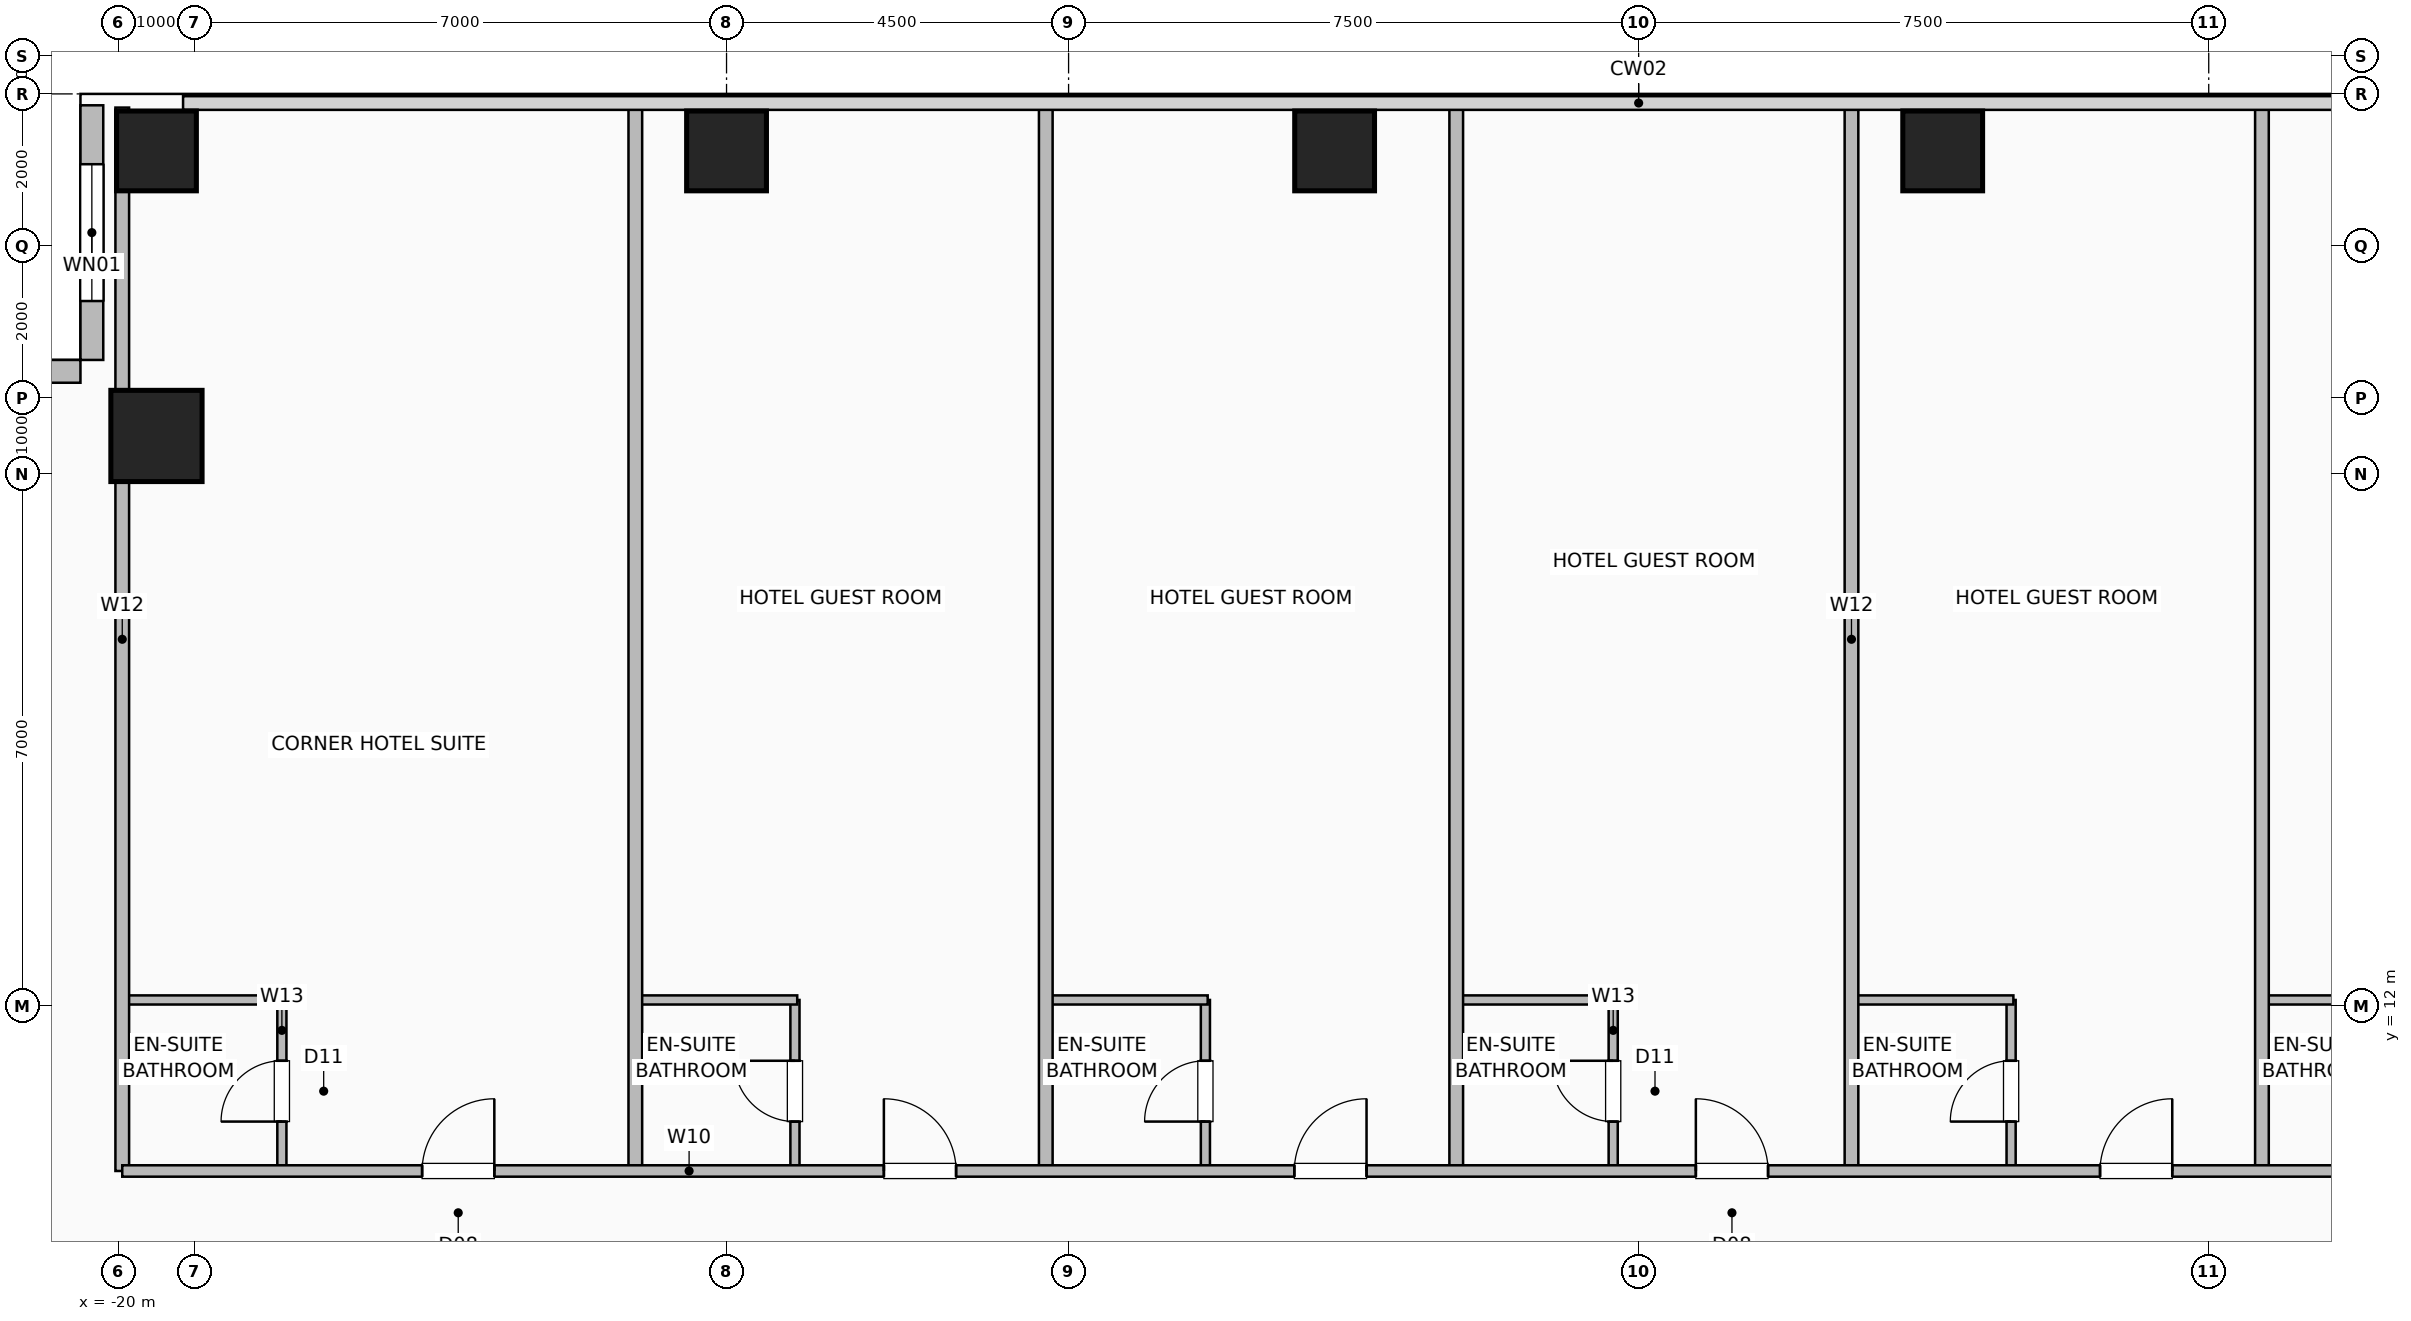
"""IFC4 building model, lengths in metres.
Left out: names, types, materials, properties, quantities, classifications, styles, units other than length and angle.
Written with IfcOpenShell. Run it as: python <this file> out.ifc"""

import sys

from ifc_helpers import new_model, si_unit, direction, frame, frame_2d, origin, origin_2d, place, context, subcontext, project, spatial, rectangle, hollow_rectangle, extrude, element, fill, save


model = new_model("IFC4")
c1 = context("Model", 3, precision=1e-05, world=origin(), true_north=direction((0.0, 1.0)))
c2 = subcontext(c1, "Body", "Model", "MODEL_VIEW")
j1 = project(units=[si_unit("LENGTHUNIT", "METRE"), si_unit("PLANEANGLEUNIT", "RADIAN")], contexts=[c1])
p1 = place(None, origin())
s1 = spatial("IfcSite", under=j1, at=p1, CompositionType="ELEMENT")
p2 = place(p1, origin())
s2 = spatial("IfcBuilding", under=s1, at=p2, CompositionType="ELEMENT")
p3 = place(p2, frame((0.0, 0.0, 72.5)))
s3 = spatial("IfcBuildingStorey", under=s2, at=p3, CompositionType="ELEMENT", Elevation=72.5)
for number, where, z_axis, x_axis in (
    (1, (-19.5, 23.25, 0.0), (0.0, 0.0, 1.0), (1.0, 0.0, 0.0)),
    (2, (-12.0, 23.25, 0.0), (0.0, 0.0, 1.0), (1.0, 0.0, 0.0)),
    (3, (-4.0, 23.25, 0.0), (0.0, 0.0, 1.0), (1.0, 0.0, 0.0)),
    (4, (4.0, 23.25, 0.0), (0.0, 0.0, 1.0), (1.0, 0.0, 0.0)),
):
    element("IfcColumn", number, at=place(p3, frame(where, z_axis=z_axis, x_axis=x_axis)), inside=s3, PredefinedType="COLUMN", context=c2, shape_type="SweptSolid", body=[
        extrude(hollow_rectangle(XDim=1.05, YDim=1.05, WallThickness=0.05, at=origin_2d()), origin(), (0.0, 0.0, 1.0), 3.5),
    ])
p4 = place(p3, frame((-19.5, 19.5, 0.0), z_axis=(0.0, 0.0, 1.0), x_axis=(1.0, 0.0, 0.0)))
e5 = element("IfcColumn", 5, at=p4, inside=s3, PredefinedType="COLUMN", context=c2, shape_type="SweptSolid", body=[
    extrude(hollow_rectangle(XDim=1.2, YDim=1.2, WallThickness=0.055, at=origin_2d()), origin(), (0.0, 0.0, 1.0), 3.5),
])
p5 = place(p3, frame((-20.35, 23.85, 0.0), z_axis=(0.0, 0.0, 1.0), x_axis=(0.0, -1.0, 0.0)))
e6 = element("IfcWall", 6, at=p5, inside=s3, PredefinedType="SOLIDWALL", context=c2, shape_type="SweptSolid", body=[
    extrude(rectangle(XDim=3.35, YDim=0.3, at=frame_2d((1.675, 0.0))), origin(), (0.0, 0.0, 1.0), 3.25),
])
p6 = place(p5, frame((0.775, 0.0, 0.9)))
e7 = element("IfcOpeningElement", 7, at=p6, cuts=e6, PredefinedType="OPENING", context=c2, shape_type="SweptSolid", body=[
    extrude(rectangle(XDim=1.8, YDim=1.8, at=frame_2d((0.9, 0.9))), frame((0.0, 0.16, 0.0), z_axis=(0.0, -1.0, 0.0), x_axis=(1.0, 0.0, 0.0)), (0.0, 0.0, 1.0), 0.32),
])
p7 = place(p3, frame((-23.85, 20.35, 0.0), z_axis=(0.0, 0.0, 1.0), x_axis=(1.0, 0.0, 0.0)))
e8 = element("IfcWall", 8, at=p7, inside=s3, PredefinedType="SOLIDWALL", context=c2, shape_type="SweptSolid", body=[
    extrude(rectangle(XDim=3.35, YDim=0.3, at=frame_2d((1.675, 0.0))), origin(), (0.0, 0.0, 1.0), 3.25),
])
p8 = place(p3, frame((-17.85, 9.83, 0.0), z_axis=(0.0, 0.0, 1.0), x_axis=(0.0, 1.0, 0.0)))
e9 = element("IfcWall", 9, at=p8, inside=s3, PredefinedType="PLUMBINGWALL", context=c2, shape_type="SweptSolid", body=[
    extrude(rectangle(XDim=2.25, YDim=0.12, at=frame_2d((1.125, 0.0))), origin(), (0.0, 0.0, 1.0), 3.25),
])
p9 = place(p8, frame((0.65, 0.0, 0.0)))
e10 = element("IfcOpeningElement", 10, at=p9, cuts=e9, PredefinedType="OPENING", context=c2, shape_type="SweptSolid", body=[
    extrude(rectangle(XDim=0.8, YDim=2.05, at=frame_2d((0.4, 1.025))), frame((0.0, 0.07, 0.0), z_axis=(0.0, -1.0, 0.0), x_axis=(1.0, 0.0, 0.0)), (0.0, 0.0, 1.0), 0.14),
])
p10 = place(p3, frame((-19.92, 12.08, 0.0), z_axis=(0.0, 0.0, 1.0), x_axis=(1.0, 0.0, 0.0)))
e11 = element("IfcWall", 11, at=p10, inside=s3, PredefinedType="PLUMBINGWALL", context=c2, shape_type="SweptSolid", body=[
    extrude(rectangle(XDim=2.1, YDim=0.12, at=frame_2d((1.05, 0.0))), origin(), (0.0, 0.0, 1.0), 3.25),
])
p11 = place(p3, frame((-11.1, 9.83, 0.0), z_axis=(0.0, 0.0, 1.0), x_axis=(0.0, 1.0, 0.0)))
e12 = element("IfcWall", 12, at=p11, inside=s3, PredefinedType="PLUMBINGWALL", context=c2, shape_type="SweptSolid", body=[
    extrude(rectangle(XDim=2.25, YDim=0.12, at=frame_2d((1.125, 0.0))), origin(), (0.0, 0.0, 1.0), 3.25),
])
p12 = place(p11, frame((0.65, 0.0, 0.0)))
e13 = element("IfcOpeningElement", 13, at=p12, cuts=e12, PredefinedType="OPENING", context=c2, shape_type="SweptSolid", body=[
    extrude(rectangle(XDim=0.8, YDim=2.05, at=frame_2d((0.4, 1.025))), frame((0.0, 0.07, 0.0), z_axis=(0.0, -1.0, 0.0), x_axis=(1.0, 0.0, 0.0)), (0.0, 0.0, 1.0), 0.14),
])
p13 = place(p3, frame((-13.17, 12.08, 0.0), z_axis=(0.0, 0.0, 1.0), x_axis=(1.0, 0.0, 0.0)))
e14 = element("IfcWall", 14, at=p13, inside=s3, PredefinedType="PLUMBINGWALL", context=c2, shape_type="SweptSolid", body=[
    extrude(rectangle(XDim=2.1, YDim=0.12, at=frame_2d((1.05, 0.0))), origin(), (0.0, 0.0, 1.0), 3.25),
])
p14 = place(p3, frame((-5.7, 9.83, 0.0), z_axis=(0.0, 0.0, 1.0), x_axis=(0.0, 1.0, 0.0)))
e15 = element("IfcWall", 15, at=p14, inside=s3, PredefinedType="PLUMBINGWALL", context=c2, shape_type="SweptSolid", body=[
    extrude(rectangle(XDim=2.25, YDim=0.12, at=frame_2d((1.125, 0.0))), origin(), (0.0, 0.0, 1.0), 3.25),
])
p15 = place(p14, frame((0.65, 0.0, 0.0)))
e16 = element("IfcOpeningElement", 16, at=p15, cuts=e15, PredefinedType="OPENING", context=c2, shape_type="SweptSolid", body=[
    extrude(rectangle(XDim=0.8, YDim=2.05, at=frame_2d((0.4, 1.025))), frame((0.0, 0.07, 0.0), z_axis=(0.0, -1.0, 0.0), x_axis=(1.0, 0.0, 0.0)), (0.0, 0.0, 1.0), 0.14),
])
p16 = place(p3, frame((-7.77, 12.08, 0.0), z_axis=(0.0, 0.0, 1.0), x_axis=(1.0, 0.0, 0.0)))
e17 = element("IfcWall", 17, at=p16, inside=s3, PredefinedType="PLUMBINGWALL", context=c2, shape_type="SweptSolid", body=[
    extrude(rectangle(XDim=2.1, YDim=0.12, at=frame_2d((1.05, 0.0))), origin(), (0.0, 0.0, 1.0), 3.25),
])
p17 = place(p3, frame((-0.335, 9.83, 0.0), z_axis=(0.0, 0.0, 1.0), x_axis=(0.0, 1.0, 0.0)))
e18 = element("IfcWall", 18, at=p17, inside=s3, PredefinedType="PLUMBINGWALL", context=c2, shape_type="SweptSolid", body=[
    extrude(rectangle(XDim=2.25, YDim=0.12, at=frame_2d((1.125, 0.0))), origin(), (0.0, 0.0, 1.0), 3.25),
])
p18 = place(p17, frame((0.65, 0.0, 0.0)))
e19 = element("IfcOpeningElement", 19, at=p18, cuts=e18, PredefinedType="OPENING", context=c2, shape_type="SweptSolid", body=[
    extrude(rectangle(XDim=0.8, YDim=2.05, at=frame_2d((0.4, 1.025))), frame((0.0, 0.07, 0.0), z_axis=(0.0, -1.0, 0.0), x_axis=(1.0, 0.0, 0.0)), (0.0, 0.0, 1.0), 0.14),
])
p19 = place(p3, frame((-2.37, 12.08, 0.0), z_axis=(0.0, 0.0, 1.0), x_axis=(1.0, 0.0, 0.0)))
e20 = element("IfcWall", 20, at=p19, inside=s3, PredefinedType="PLUMBINGWALL", context=c2, shape_type="SweptSolid", body=[
    extrude(rectangle(XDim=2.065, YDim=0.12, at=frame_2d((1.033, 0.0))), origin(), (0.0, 0.0, 1.0), 3.25),
])
p20 = place(p3, frame((4.9, 9.83, 0.0), z_axis=(0.0, 0.0, 1.0), x_axis=(0.0, 1.0, 0.0)))
e21 = element("IfcWall", 21, at=p20, inside=s3, PredefinedType="PLUMBINGWALL", context=c2, shape_type="SweptSolid", body=[
    extrude(rectangle(XDim=2.25, YDim=0.12, at=frame_2d((1.125, 0.0))), origin(), (0.0, 0.0, 1.0), 3.25),
])
p21 = place(p20, frame((0.65, 0.0, 0.0)))
e22 = element("IfcOpeningElement", 22, at=p21, cuts=e21, PredefinedType="OPENING", context=c2, shape_type="SweptSolid", body=[
    extrude(rectangle(XDim=0.8, YDim=2.05, at=frame_2d((0.4, 1.025))), frame((0.0, 0.07, 0.0), z_axis=(0.0, -1.0, 0.0), x_axis=(1.0, 0.0, 0.0)), (0.0, 0.0, 1.0), 0.14),
])
p22 = place(p3, frame((2.83, 12.08, 0.0), z_axis=(0.0, 0.0, 1.0), x_axis=(1.0, 0.0, 0.0)))
e23 = element("IfcWall", 23, at=p22, inside=s3, PredefinedType="PLUMBINGWALL", context=c2, shape_type="SweptSolid", body=[
    extrude(rectangle(XDim=2.1, YDim=0.12, at=frame_2d((1.05, 0.0))), origin(), (0.0, 0.0, 1.0), 3.25),
])
p23 = place(p3, frame((8.23, 12.08, 0.0), z_axis=(0.0, 0.0, 1.0), x_axis=(1.0, 0.0, 0.0)))
e24 = element("IfcWall", 24, at=p23, inside=s3, PredefinedType="PLUMBINGWALL", context=c2, shape_type="SweptSolid", body=[
    extrude(rectangle(XDim=2.1, YDim=0.12, at=frame_2d((1.05, 0.0))), origin(), (0.0, 0.0, 1.0), 3.25),
])
for number, where, z_axis, x_axis in (
    (25, (-19.95, 9.83, 0.0), (0.0, 0.0, 1.0), (0.0, 1.0, 0.0)),
    (26, (-13.2, 9.83, 0.0), (0.0, 0.0, 1.0), (0.0, 1.0, 0.0)),
    (27, (-7.8, 9.83, 0.0), (0.0, 0.0, 1.0), (0.0, 1.0, 0.0)),
    (28, (-2.4, 9.83, 0.0), (0.0, 0.0, 1.0), (0.0, 1.0, 0.0)),
    (29, (2.8, 9.83, 0.0), (0.0, 0.0, 1.0), (0.0, 1.0, 0.0)),
    (30, (8.2, 9.83, 0.0), (0.0, 0.0, 1.0), (0.0, 1.0, 0.0)),
):
    element("IfcWall", number, at=place(p3, frame(where, z_axis=z_axis, x_axis=x_axis)), inside=s3, PredefinedType="PARTITIONING", context=c2, shape_type="SweptSolid", body=[
        extrude(rectangle(XDim=13.99, YDim=0.18, at=frame_2d((6.995, 0.0))), origin(), (0.0, 0.0, 1.0), 3.25),
    ])
p24 = place(p3, frame((-19.95, 9.83, 0.0), z_axis=(0.0, 0.0, 1.0), x_axis=(1.0, 0.0, 0.0)))
e31 = element("IfcWall", 31, at=p24, inside=s3, PredefinedType="PARTITIONING", context=c2, shape_type="SweptSolid", body=[
    extrude(rectangle(XDim=39.9, YDim=0.15, at=frame_2d((19.95, 0.0))), origin(), (0.0, 0.0, 1.0), 3.25),
])
p25 = place(p24, frame((3.945, 0.0, 0.0)))
e32 = element("IfcOpeningElement", 32, at=p25, cuts=e31, PredefinedType="OPENING", context=c2, shape_type="SweptSolid", body=[
    extrude(rectangle(XDim=0.95, YDim=2.08, at=frame_2d((0.475, 1.04))), frame((0.0, 0.085, 0.0), z_axis=(0.0, -1.0, 0.0), x_axis=(1.0, 0.0, 0.0)), (0.0, 0.0, 1.0), 0.17),
])
p26 = place(p24, frame((10.02, 0.0, 0.0)))
e33 = element("IfcOpeningElement", 33, at=p26, cuts=e31, PredefinedType="OPENING", context=c2, shape_type="SweptSolid", body=[
    extrude(rectangle(XDim=0.95, YDim=2.08, at=frame_2d((0.475, 1.04))), frame((0.0, 0.085, 0.0), z_axis=(0.0, -1.0, 0.0), x_axis=(1.0, 0.0, 0.0)), (0.0, 0.0, 1.0), 0.17),
])
p27 = place(p24, frame((15.42, 0.0, 0.0)))
e34 = element("IfcOpeningElement", 34, at=p27, cuts=e31, PredefinedType="OPENING", context=c2, shape_type="SweptSolid", body=[
    extrude(rectangle(XDim=0.95, YDim=2.08, at=frame_2d((0.475, 1.04))), frame((0.0, 0.085, 0.0), z_axis=(0.0, -1.0, 0.0), x_axis=(1.0, 0.0, 0.0)), (0.0, 0.0, 1.0), 0.17),
])
p28 = place(p24, frame((20.702, 0.0, 0.0)))
e35 = element("IfcOpeningElement", 35, at=p28, cuts=e31, PredefinedType="OPENING", context=c2, shape_type="SweptSolid", body=[
    extrude(rectangle(XDim=0.95, YDim=2.08, at=frame_2d((0.475, 1.04))), frame((0.0, 0.085, 0.0), z_axis=(0.0, -1.0, 0.0), x_axis=(1.0, 0.0, 0.0)), (0.0, 0.0, 1.0), 0.17),
])
p29 = place(p24, frame((26.02, 0.0, 0.0)))
e36 = element("IfcOpeningElement", 36, at=p29, cuts=e31, PredefinedType="OPENING", context=c2, shape_type="SweptSolid", body=[
    extrude(rectangle(XDim=0.95, YDim=2.08, at=frame_2d((0.475, 1.04))), frame((0.0, 0.085, 0.0), z_axis=(0.0, -1.0, 0.0), x_axis=(1.0, 0.0, 0.0)), (0.0, 0.0, 1.0), 0.17),
])
p30 = place(p24, frame((31.37, 0.0, 0.0)))
e37 = element("IfcOpeningElement", 37, at=p30, cuts=e31, PredefinedType="OPENING", context=c2, shape_type="SweptSolid", body=[
    extrude(rectangle(XDim=0.95, YDim=2.08, at=frame_2d((0.475, 1.04))), frame((0.0, 0.085, 0.0), z_axis=(0.0, -1.0, 0.0), x_axis=(1.0, 0.0, 0.0)), (0.0, 0.0, 1.0), 0.17),
])
p31 = place(p24, frame((37.245, 0.0, 0.0)))
e38 = element("IfcOpeningElement", 38, at=p31, cuts=e31, PredefinedType="OPENING", context=c2, shape_type="SweptSolid", body=[
    extrude(rectangle(XDim=0.95, YDim=2.08, at=frame_2d((0.475, 1.04))), frame((0.0, 0.085, 0.0), z_axis=(0.0, -1.0, 0.0), x_axis=(1.0, 0.0, 0.0)), (0.0, 0.0, 1.0), 0.17),
])
p32 = place(p6, origin())
e39 = element("IfcWindow", 39, at=p32, inside=s3, PartitioningType="SINGLE_PANEL", PredefinedType="WINDOW", context=c2, shape_type="SweptSolid", body=[
    extrude(rectangle(XDim=1.8, YDim=1.8, at=frame_2d((0.9, 0.9))), frame((0.0, 0.03, 0.0), z_axis=(0.0, -1.0, 0.0), x_axis=(1.0, 0.0, 0.0)), (0.0, 0.0, 1.0), 0.06),
])
fill(e7, e39)
p33 = place(p9, origin())
e40 = element("IfcDoor", 40, at=p33, inside=s3, OperationType="SINGLE_SWING_LEFT", PredefinedType="DOOR", context=c2, shape_type="SweptSolid", body=[
    extrude(rectangle(XDim=0.8, YDim=2.05, at=frame_2d((0.4, 1.025))), frame((0.0, 0.025, 0.0), z_axis=(0.0, -1.0, 0.0), x_axis=(1.0, 0.0, 0.0)), (0.0, 0.0, 1.0), 0.05),
])
fill(e10, e40)
p34 = place(p12, origin())
e41 = element("IfcDoor", 41, at=p34, inside=s3, OperationType="SINGLE_SWING_RIGHT", PredefinedType="DOOR", context=c2, shape_type="SweptSolid", body=[
    extrude(rectangle(XDim=0.8, YDim=2.05, at=frame_2d((0.4, 1.025))), frame((0.0, 0.025, 0.0), z_axis=(0.0, -1.0, 0.0), x_axis=(1.0, 0.0, 0.0)), (0.0, 0.0, 1.0), 0.05),
])
fill(e13, e41)
p35 = place(p15, origin())
e42 = element("IfcDoor", 42, at=p35, inside=s3, OperationType="SINGLE_SWING_LEFT", PredefinedType="DOOR", context=c2, shape_type="SweptSolid", body=[
    extrude(rectangle(XDim=0.8, YDim=2.05, at=frame_2d((0.4, 1.025))), frame((0.0, 0.025, 0.0), z_axis=(0.0, -1.0, 0.0), x_axis=(1.0, 0.0, 0.0)), (0.0, 0.0, 1.0), 0.05),
])
fill(e16, e42)
p36 = place(p18, origin())
e43 = element("IfcDoor", 43, at=p36, inside=s3, OperationType="SINGLE_SWING_RIGHT", PredefinedType="DOOR", context=c2, shape_type="SweptSolid", body=[
    extrude(rectangle(XDim=0.8, YDim=2.05, at=frame_2d((0.4, 1.025))), frame((0.0, 0.025, 0.0), z_axis=(0.0, -1.0, 0.0), x_axis=(1.0, 0.0, 0.0)), (0.0, 0.0, 1.0), 0.05),
])
fill(e19, e43)
p37 = place(p21, origin())
e44 = element("IfcDoor", 44, at=p37, inside=s3, OperationType="SINGLE_SWING_LEFT", PredefinedType="DOOR", context=c2, shape_type="SweptSolid", body=[
    extrude(rectangle(XDim=0.8, YDim=2.05, at=frame_2d((0.4, 1.025))), frame((0.0, 0.025, 0.0), z_axis=(0.0, -1.0, 0.0), x_axis=(1.0, 0.0, 0.0)), (0.0, 0.0, 1.0), 0.05),
])
fill(e22, e44)
p38 = place(p25, origin())
e45 = element("IfcDoor", 45, at=p38, inside=s3, OperationType="SINGLE_SWING_RIGHT", PredefinedType="DOOR", context=c2, shape_type="SweptSolid", body=[
    extrude(rectangle(XDim=0.95, YDim=2.08, at=frame_2d((0.475, 1.04))), frame((0.0, 0.025, 0.0), z_axis=(0.0, -1.0, 0.0), x_axis=(1.0, 0.0, 0.0)), (0.0, 0.0, 1.0), 0.05),
])
fill(e32, e45)
p39 = place(p26, origin())
e46 = element("IfcDoor", 46, at=p39, inside=s3, OperationType="SINGLE_SWING_LEFT", PredefinedType="DOOR", context=c2, shape_type="SweptSolid", body=[
    extrude(rectangle(XDim=0.95, YDim=2.08, at=frame_2d((0.475, 1.04))), frame((0.0, 0.025, 0.0), z_axis=(0.0, -1.0, 0.0), x_axis=(1.0, 0.0, 0.0)), (0.0, 0.0, 1.0), 0.05),
])
fill(e33, e46)
p40 = place(p27, origin())
e47 = element("IfcDoor", 47, at=p40, inside=s3, OperationType="SINGLE_SWING_RIGHT", PredefinedType="DOOR", context=c2, shape_type="SweptSolid", body=[
    extrude(rectangle(XDim=0.95, YDim=2.08, at=frame_2d((0.475, 1.04))), frame((0.0, 0.025, 0.0), z_axis=(0.0, -1.0, 0.0), x_axis=(1.0, 0.0, 0.0)), (0.0, 0.0, 1.0), 0.05),
])
fill(e34, e47)
p41 = place(p28, origin())
e48 = element("IfcDoor", 48, at=p41, inside=s3, OperationType="SINGLE_SWING_LEFT", PredefinedType="DOOR", context=c2, shape_type="SweptSolid", body=[
    extrude(rectangle(XDim=0.95, YDim=2.08, at=frame_2d((0.475, 1.04))), frame((0.0, 0.025, 0.0), z_axis=(0.0, -1.0, 0.0), x_axis=(1.0, 0.0, 0.0)), (0.0, 0.0, 1.0), 0.05),
])
fill(e35, e48)
p42 = place(p29, origin())
e49 = element("IfcDoor", 49, at=p42, inside=s3, OperationType="SINGLE_SWING_RIGHT", PredefinedType="DOOR", context=c2, shape_type="SweptSolid", body=[
    extrude(rectangle(XDim=0.95, YDim=2.08, at=frame_2d((0.475, 1.04))), frame((0.0, 0.025, 0.0), z_axis=(0.0, -1.0, 0.0), x_axis=(1.0, 0.0, 0.0)), (0.0, 0.0, 1.0), 0.05),
])
fill(e36, e49)
save(model, sys.argv[1])
